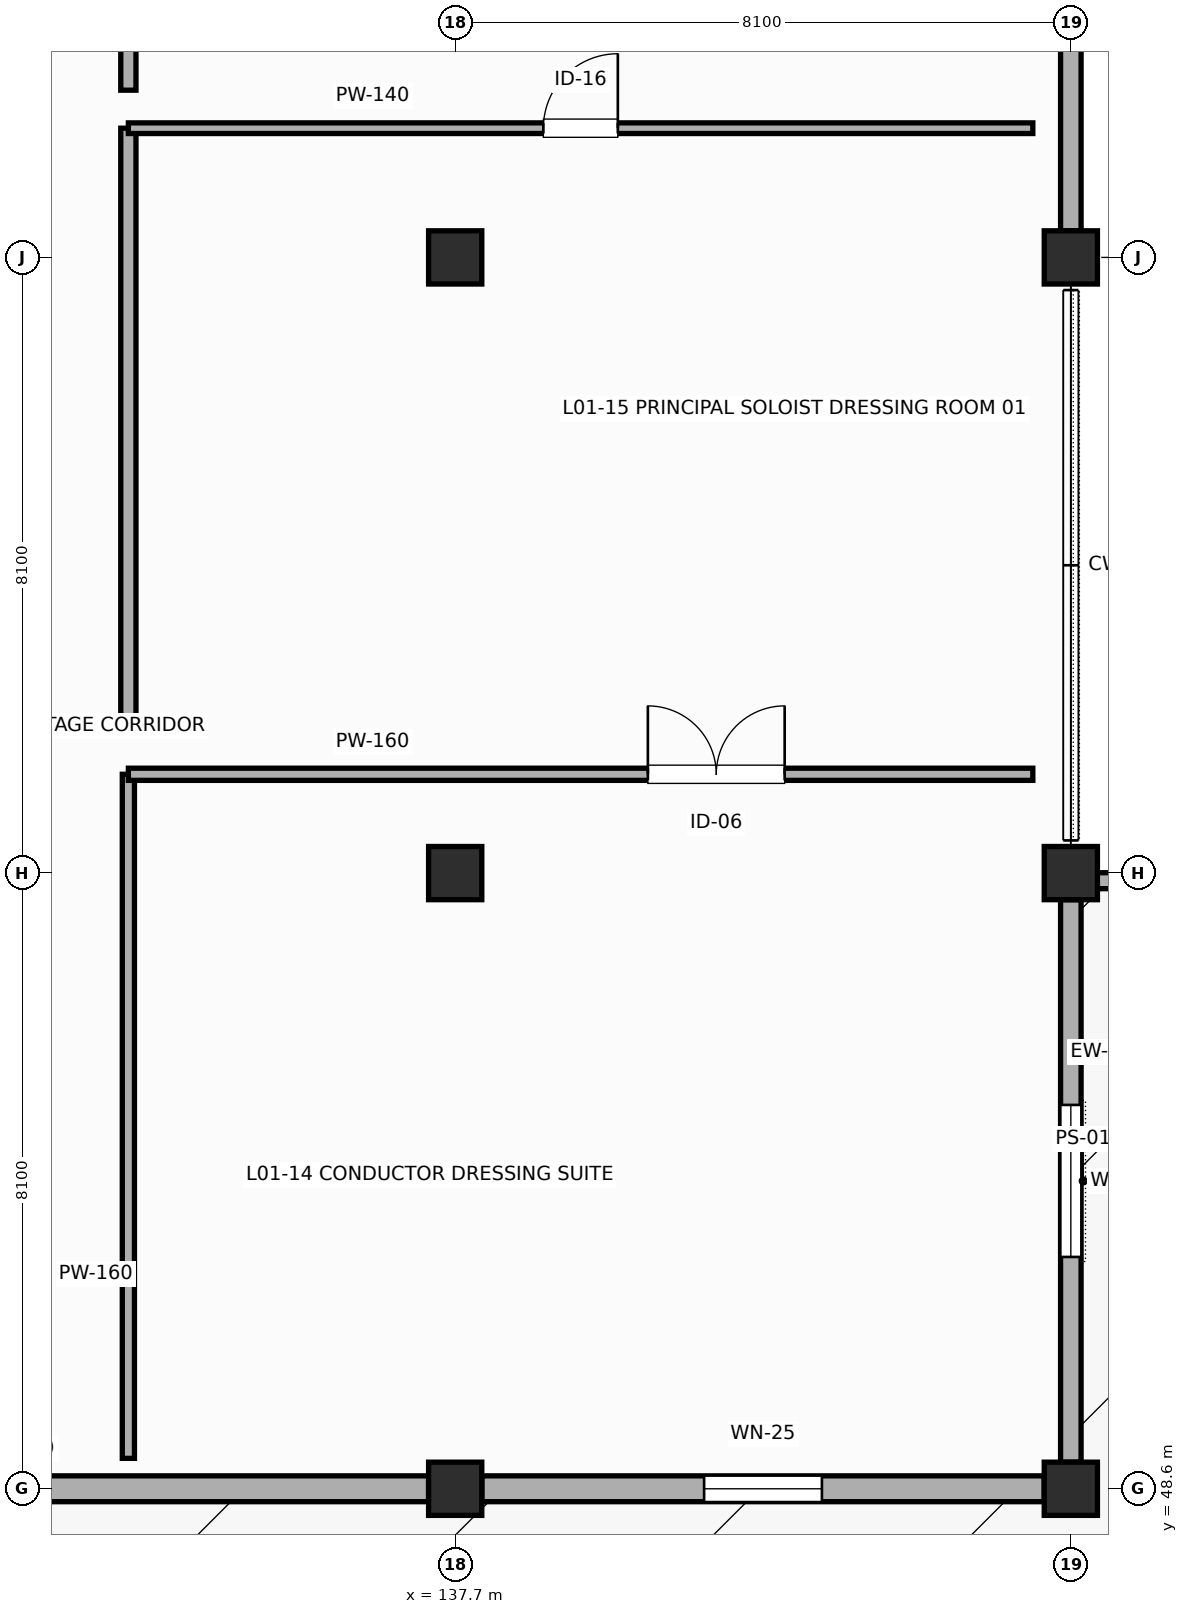
"""IFC4 building model, lengths in metres.
Left out: names, types, materials, properties, quantities, classifications, styles, units other than length and angle.
Written with IfcOpenShell. Run it as: python <this file> out.ifc"""

import sys

from ifc_helpers import new_model, si_unit, direction, frame, frame_2d, origin, origin_2d, place, context, subcontext, project, spatial, rectangle, extrude, element, fill, save


model = new_model("IFC4")
c1 = context("Model", 3, precision=1e-05, world=origin(), true_north=direction((0.0, 1.0)))
c2 = subcontext(c1, "Body", "Model", "MODEL_VIEW")
j1 = project(units=[si_unit("LENGTHUNIT", "METRE"), si_unit("PLANEANGLEUNIT", "RADIAN")], contexts=[c1])
p1 = place(None, origin())
s1 = spatial("IfcSite", under=j1, at=p1, CompositionType="ELEMENT")
p2 = place(p1, origin())
s2 = spatial("IfcBuilding", under=s1, at=p2, CompositionType="ELEMENT")
p3 = place(p2, frame((0.0, 0.0, 5.4)))
s3 = spatial("IfcBuildingStorey", under=s2, at=p3, CompositionType="ELEMENT", Elevation=5.4)
for number, where, z_axis, x_axis in (
    (1, (137.7, 48.6, 0.0), (0.0, 0.0, 1.0), (1.0, 0.0, 0.0)),
    (2, (137.7, 56.7, 0.0), (0.0, 0.0, 1.0), (1.0, 0.0, 0.0)),
    (3, (137.7, 64.8, 0.0), (0.0, 0.0, 1.0), (1.0, 0.0, 0.0)),
    (4, (145.8, 48.6, 0.0), (0.0, 0.0, 1.0), (1.0, 0.0, 0.0)),
    (5, (145.8, 56.7, 0.0), (0.0, 0.0, 1.0), (1.0, 0.0, 0.0)),
    (6, (145.8, 64.8, 0.0), (0.0, 0.0, 1.0), (1.0, 0.0, 0.0)),
):
    element("IfcColumn", number, at=place(p3, frame(where, z_axis=z_axis, x_axis=x_axis)), inside=s3, PredefinedType="COLUMN", context=c2, shape_type="SweptSolid", body=[
        extrude(rectangle(XDim=0.7, YDim=0.7, at=origin_2d()), origin(), (0.0, 0.0, 1.0), 4.8),
    ])
p4 = place(p3, frame((145.8, 56.35, 0.0), z_axis=(0.0, 0.0, 1.0), x_axis=(0.0, -1.0, 0.0)))
e7 = element("IfcWall", 7, at=p4, inside=s3, PredefinedType="SOLIDWALL", context=c2, shape_type="SweptSolid", body=[
    extrude(rectangle(XDim=7.4, YDim=0.27, at=frame_2d((3.7, 0.0))), origin(), (0.0, 0.0, 1.0), 4.167),
])
p5 = place(p4, frame((2.7, 0.0, 0.9)))
e8 = element("IfcOpeningElement", 8, at=p5, cuts=e7, PredefinedType="OPENING", context=c2, shape_type="SweptSolid", body=[
    extrude(rectangle(XDim=2.0, YDim=1.4, at=frame_2d((1.0, 0.7))), frame((0.0, 0.145, 0.0), z_axis=(0.0, -1.0, 0.0), x_axis=(1.0, 0.0, 0.0)), (0.0, 0.0, 1.0), 0.29),
])
p6 = place(p3, frame((145.8, 72.55, 0.0), z_axis=(0.0, 0.0, 1.0), x_axis=(0.0, -1.0, 0.0)))
e9 = element("IfcWall", 9, at=p6, inside=s3, PredefinedType="SOLIDWALL", context=c2, shape_type="SweptSolid", body=[
    extrude(rectangle(XDim=7.4, YDim=0.27, at=frame_2d((3.7, 0.0))), origin(), (0.0, 0.0, 1.0), 4.167),
])
p7 = place(p6, frame((2.7, 0.0, 0.9)))
e10 = element("IfcOpeningElement", 10, at=p7, cuts=e9, PredefinedType="OPENING", context=c2, shape_type="SweptSolid", body=[
    extrude(rectangle(XDim=2.0, YDim=1.8, at=frame_2d((1.0, 0.9))), frame((0.0, 0.145, 0.0), z_axis=(0.0, -1.0, 0.0), x_axis=(1.0, 0.0, 0.0)), (0.0, 0.0, 1.0), 0.29),
])
p8 = place(p3, frame((129.95, 48.6, 0.0), z_axis=(0.0, 0.0, 1.0), x_axis=(1.0, 0.0, 0.0)))
e11 = element("IfcWall", 11, at=p8, inside=s3, PredefinedType="SOLIDWALL", context=c2, shape_type="SweptSolid", body=[
    extrude(rectangle(XDim=7.4, YDim=0.34, at=frame_2d((3.7, 0.0))), origin(), (0.0, 0.0, 1.0), 4.055),
])
p9 = place(p3, frame((138.05, 48.6, 0.0), z_axis=(0.0, 0.0, 1.0), x_axis=(1.0, 0.0, 0.0)))
e12 = element("IfcWall", 12, at=p9, inside=s3, PredefinedType="SOLIDWALL", context=c2, shape_type="SweptSolid", body=[
    extrude(rectangle(XDim=7.4, YDim=0.34, at=frame_2d((3.7, 0.0))), origin(), (0.0, 0.0, 1.0), 4.107),
])
p10 = place(p9, frame((2.925, 0.0, 0.9)))
e13 = element("IfcOpeningElement", 13, at=p10, cuts=e12, PredefinedType="OPENING", context=c2, shape_type="SweptSolid", body=[
    extrude(rectangle(XDim=1.55, YDim=1.85, at=frame_2d((0.775, 0.925))), frame((0.0, 0.18, 0.0), z_axis=(0.0, -1.0, 0.0), x_axis=(1.0, 0.0, 0.0)), (0.0, 0.0, 1.0), 0.36),
])
p11 = place(p3, frame((161.9, 56.6, 0.0), z_axis=(0.0, 0.0, 1.0), x_axis=(-1.0, 0.0, 0.0)))
e14 = element("IfcWall", 14, at=p11, inside=s3, PredefinedType="PARAPET", context=c2, shape_type="SweptSolid", body=[
    extrude(rectangle(XDim=16.0, YDim=0.21, at=frame_2d((8.0, 0.0))), origin(), (0.0, 0.0, 1.0), 1.1),
])
p12 = place(p3, frame((133.4, 49.0, 0.0), z_axis=(0.0, 0.0, 1.0), x_axis=(0.0, 1.0, 0.0)))
e15 = element("IfcWall", 15, at=p12, inside=s3, PredefinedType="PARTITIONING", context=c2, shape_type="SweptSolid", body=[
    extrude(rectangle(XDim=9.0, YDim=0.16, at=frame_2d((4.5, 0.0))), origin(), (0.0, 0.0, 1.0), 4.52),
])
p13 = place(p3, frame((133.4, 58.0, 0.0), z_axis=(0.0, 0.0, 1.0), x_axis=(1.0, 0.0, 0.0)))
e16 = element("IfcWall", 16, at=p13, inside=s3, PredefinedType="PARTITIONING", context=c2, shape_type="SweptSolid", body=[
    extrude(rectangle(XDim=11.9, YDim=0.16, at=frame_2d((5.95, 0.0))), origin(), (0.0, 0.0, 1.0), 4.52),
])
p14 = place(p13, frame((6.835, 0.0, 0.0)))
e17 = element("IfcOpeningElement", 17, at=p14, cuts=e16, PredefinedType="OPENING", context=c2, shape_type="SweptSolid", body=[
    extrude(rectangle(XDim=1.8, YDim=2.5, at=frame_2d((0.9, 1.25))), frame((0.0, 0.09, 0.0), z_axis=(0.0, -1.0, 0.0), x_axis=(1.0, 0.0, 0.0)), (0.0, 0.0, 1.0), 0.18),
])
p15 = place(p3, frame((133.4, 58.5, 0.0), z_axis=(0.0, 0.0, 1.0), x_axis=(0.0, 1.0, 0.0)))
e18 = element("IfcWall", 18, at=p15, inside=s3, PredefinedType="PARTITIONING", context=c2, shape_type="SweptSolid", body=[
    extrude(rectangle(XDim=8.0, YDim=0.2, at=frame_2d((4.0, 0.0))), origin(), (0.0, 0.0, 1.0), 4.52),
])
p16 = place(p3, frame((133.4, 66.5, 0.0), z_axis=(0.0, 0.0, 1.0), x_axis=(1.0, 0.0, 0.0)))
e19 = element("IfcWall", 19, at=p16, inside=s3, PredefinedType="PARTITIONING", context=c2, shape_type="SweptSolid", body=[
    extrude(rectangle(XDim=11.9, YDim=0.14, at=frame_2d((5.95, 0.0))), origin(), (0.0, 0.0, 1.0), 4.52),
])
p17 = place(p16, frame((5.46, 0.0, 0.0)))
e20 = element("IfcOpeningElement", 20, at=p17, cuts=e19, PredefinedType="OPENING", context=c2, shape_type="SweptSolid", body=[
    extrude(rectangle(XDim=0.98, YDim=2.1, at=frame_2d((0.49, 1.05))), frame((0.0, 0.08, 0.0), z_axis=(0.0, -1.0, 0.0), x_axis=(1.0, 0.0, 0.0)), (0.0, 0.0, 1.0), 0.16),
])
p18 = place(p3, frame((133.4, 67.0, 0.0), z_axis=(0.0, 0.0, 1.0), x_axis=(0.0, 1.0, 0.0)))
e21 = element("IfcWall", 21, at=p18, inside=s3, PredefinedType="PARTITIONING", context=c2, shape_type="SweptSolid", body=[
    extrude(rectangle(XDim=7.5, YDim=0.2, at=frame_2d((3.75, 0.0))), origin(), (0.0, 0.0, 1.0), 4.52),
])
p19 = place(p5, origin())
e22 = element("IfcWindow", 22, at=p19, inside=s3, PartitioningType="SINGLE_PANEL", PredefinedType="WINDOW", context=c2, shape_type="SweptSolid", body=[
    extrude(rectangle(XDim=2.0, YDim=1.4, at=frame_2d((1.0, 0.7))), frame((0.0, 0.03, 0.0), z_axis=(0.0, -1.0, 0.0), x_axis=(1.0, 0.0, 0.0)), (0.0, 0.0, 1.0), 0.06),
])
fill(e8, e22)
p20 = place(p10, origin())
e23 = element("IfcWindow", 23, at=p20, inside=s3, PartitioningType="SINGLE_PANEL", PredefinedType="WINDOW", context=c2, shape_type="SweptSolid", body=[
    extrude(rectangle(XDim=1.55, YDim=1.85, at=frame_2d((0.775, 0.925))), frame((0.0, 0.03, 0.0), z_axis=(0.0, -1.0, 0.0), x_axis=(1.0, 0.0, 0.0)), (0.0, 0.0, 1.0), 0.06),
])
fill(e13, e23)
p21 = place(p14, origin())
e24 = element("IfcDoor", 24, at=p21, inside=s3, OperationType="DOUBLE_DOOR_SINGLE_SWING", PredefinedType="DOOR", context=c2, shape_type="SweptSolid", body=[
    extrude(rectangle(XDim=1.8, YDim=2.5, at=frame_2d((0.9, 1.25))), frame((0.0, 0.025, 0.0), z_axis=(0.0, -1.0, 0.0), x_axis=(1.0, 0.0, 0.0)), (0.0, 0.0, 1.0), 0.05),
])
fill(e17, e24)
p22 = place(p17, origin())
e25 = element("IfcDoor", 25, at=p22, inside=s3, OperationType="SINGLE_SWING_RIGHT", PredefinedType="DOOR", context=c2, shape_type="SweptSolid", body=[
    extrude(rectangle(XDim=0.98, YDim=2.1, at=frame_2d((0.49, 1.05))), frame((0.0, 0.025, 0.0), z_axis=(0.0, -1.0, 0.0), x_axis=(1.0, 0.0, 0.0)), (0.0, 0.0, 1.0), 0.05),
])
fill(e20, e25)
save(model, sys.argv[1])
